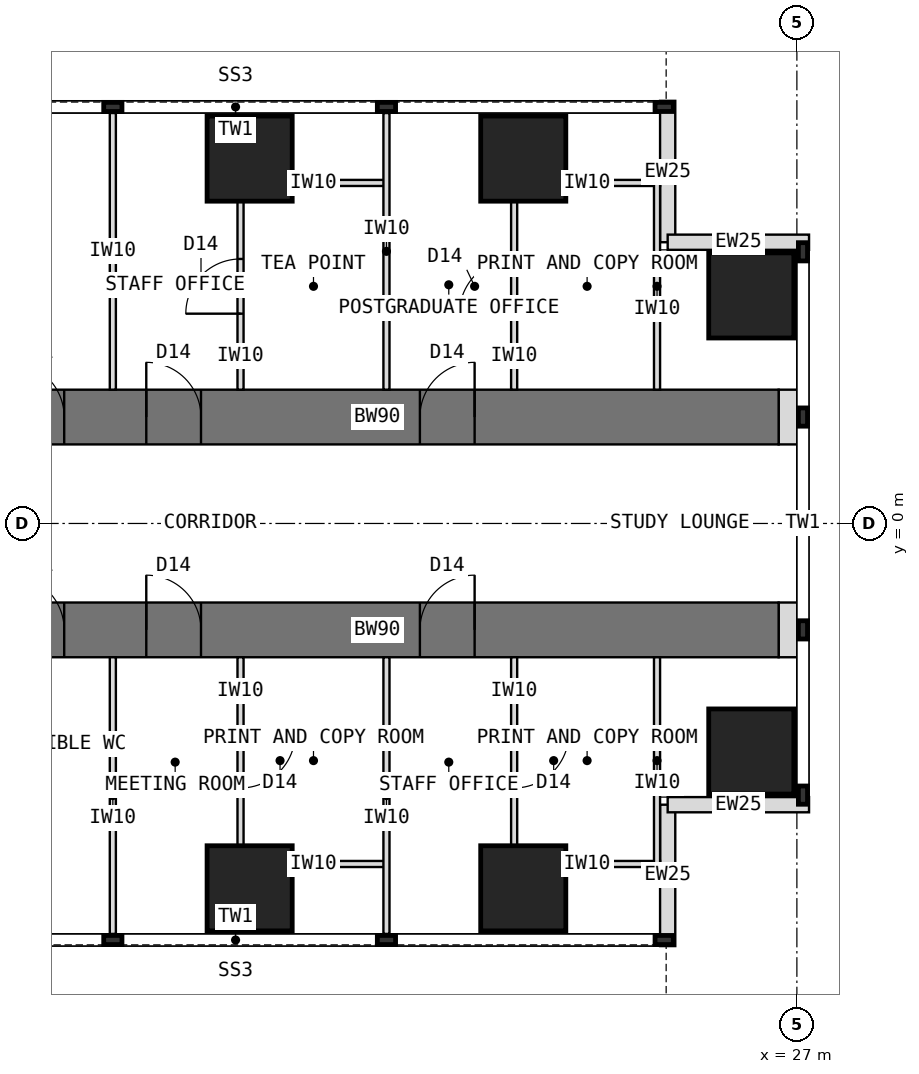
"""IFC4 building model, lengths in metres.
Left out: names, types, materials, properties, quantities, classifications, styles, units other than length and angle.
Written with IfcOpenShell. Run it as: python <this file> out.ifc"""

import sys

from ifc_helpers import new_model, si_unit, direction, frame, frame_2d, origin, origin_2d, place, context, subcontext, project, spatial, rectangle, extrude, element, fill, save


model = new_model("IFC4")
c1 = context("Model", 3, precision=1e-05, world=origin(), true_north=direction((0.0, 1.0)))
c2 = subcontext(c1, "Body", "Model", "MODEL_VIEW")
j1 = project(units=[si_unit("LENGTHUNIT", "METRE"), si_unit("PLANEANGLEUNIT", "RADIAN")], contexts=[c1])
p1 = place(None, origin())
s1 = spatial("IfcSite", under=j1, at=p1, CompositionType="ELEMENT")
p2 = place(p1, origin())
s2 = spatial("IfcBuilding", under=s1, at=p2, CompositionType="ELEMENT")
p3 = place(p2, frame((0.0, 0.0, 88.5)))
s3 = spatial("IfcBuildingStorey", under=s2, at=p3, CompositionType="ELEMENT", Elevation=88.5)
p4 = place(p3, frame((13.5, 1.75, 0.0), z_axis=(0.0, 0.0, 1.0), x_axis=(1.0, 0.0, 0.0)))
e1 = element("IfcWall", 1, at=p4, inside=s3, PredefinedType="SHEAR", context=c2, shape_type="SweptSolid", body=[
    extrude(rectangle(XDim=13.2, YDim=0.9, at=frame_2d((6.6, 0.0))), origin(), (0.0, 0.0, 1.0), 4.0),
])
p5 = place(p4, frame((0.55, 0.0, 0.0)))
e2 = element("IfcOpeningElement", 2, at=p5, cuts=e1, PredefinedType="OPENING", context=c2, shape_type="SweptSolid", body=[
    extrude(rectangle(XDim=0.9, YDim=2.1, at=frame_2d((0.45, 1.05))), frame((0.0, 0.46, 0.0), z_axis=(0.0, -1.0, 0.0), x_axis=(1.0, 0.0, 0.0)), (0.0, 0.0, 1.0), 0.92),
])
p6 = place(p4, frame((2.8, 0.0, 0.0)))
e3 = element("IfcOpeningElement", 3, at=p6, cuts=e1, PredefinedType="OPENING", context=c2, shape_type="SweptSolid", body=[
    extrude(rectangle(XDim=0.9, YDim=2.1, at=frame_2d((0.45, 1.05))), frame((0.0, 0.46, 0.0), z_axis=(0.0, -1.0, 0.0), x_axis=(1.0, 0.0, 0.0)), (0.0, 0.0, 1.0), 0.92),
])
p7 = place(p4, frame((7.3, 0.0, 0.0)))
e4 = element("IfcOpeningElement", 4, at=p7, cuts=e1, PredefinedType="OPENING", context=c2, shape_type="SweptSolid", body=[
    extrude(rectangle(XDim=0.9, YDim=2.1, at=frame_2d((0.45, 1.05))), frame((0.0, 0.46, 0.0), z_axis=(0.0, -1.0, 0.0), x_axis=(1.0, 0.0, 0.0)), (0.0, 0.0, 1.0), 0.92),
])
p8 = place(p3, frame((13.5, -1.75, 0.0), z_axis=(0.0, 0.0, 1.0), x_axis=(1.0, 0.0, 0.0)))
e5 = element("IfcWall", 5, at=p8, inside=s3, PredefinedType="SHEAR", context=c2, shape_type="SweptSolid", body=[
    extrude(rectangle(XDim=13.2, YDim=0.9, at=frame_2d((6.6, 0.0))), origin(), (0.0, 0.0, 1.0), 4.0),
])
p9 = place(p8, frame((0.55, 0.0, 0.0)))
e6 = element("IfcOpeningElement", 6, at=p9, cuts=e5, PredefinedType="OPENING", context=c2, shape_type="SweptSolid", body=[
    extrude(rectangle(XDim=0.9, YDim=2.1, at=frame_2d((0.45, 1.05))), frame((0.0, 0.46, 0.0), z_axis=(0.0, -1.0, 0.0), x_axis=(1.0, 0.0, 0.0)), (0.0, 0.0, 1.0), 0.92),
])
p10 = place(p8, frame((2.8, 0.0, 0.0)))
e7 = element("IfcOpeningElement", 7, at=p10, cuts=e5, PredefinedType="OPENING", context=c2, shape_type="SweptSolid", body=[
    extrude(rectangle(XDim=0.9, YDim=2.1, at=frame_2d((0.45, 1.05))), frame((0.0, 0.46, 0.0), z_axis=(0.0, -1.0, 0.0), x_axis=(1.0, 0.0, 0.0)), (0.0, 0.0, 1.0), 0.92),
])
p11 = place(p8, frame((7.3, 0.0, 0.0)))
e8 = element("IfcOpeningElement", 8, at=p11, cuts=e5, PredefinedType="OPENING", context=c2, shape_type="SweptSolid", body=[
    extrude(rectangle(XDim=0.9, YDim=2.1, at=frame_2d((0.45, 1.05))), frame((0.0, 0.46, 0.0), z_axis=(0.0, -1.0, 0.0), x_axis=(1.0, 0.0, 0.0)), (0.0, 0.0, 1.0), 0.92),
])
for number, where, z_axis, x_axis in (
    (9, (18.0, 6.0, 0.0), (0.0, 0.0, 1.0), (1.0, 0.0, 0.0)),
    (10, (18.0, -6.0, 0.0), (0.0, 0.0, 1.0), (1.0, 0.0, 0.0)),
    (11, (22.5, 6.0, 0.0), (0.0, 0.0, 1.0), (1.0, 0.0, 0.0)),
    (12, (22.5, -6.0, 0.0), (0.0, 0.0, 1.0), (1.0, 0.0, 0.0)),
    (13, (26.25, 3.75, 0.0), (0.0, 0.0, 1.0), (1.0, 0.0, 0.0)),
    (14, (26.25, -3.75, 0.0), (0.0, 0.0, 1.0), (1.0, 0.0, 0.0)),
):
    element("IfcColumn", number, at=place(p3, frame(where, z_axis=z_axis, x_axis=x_axis)), inside=s3, PredefinedType="COLUMN", context=c2, shape_type="SweptSolid", body=[
        extrude(rectangle(XDim=1.4, YDim=1.4, at=origin_2d()), origin(), (0.0, 0.0, 1.0), 4.0),
    ])
for number, where, z_axis, x_axis in (
    (15, (24.875, 6.95, 0.0), (0.0, 0.0, 1.0), (0.0, -1.0, 0.0)),
    (16, (24.875, 4.625, 0.0), (0.0, 0.0, 1.0), (1.0, 0.0, 0.0)),
    (17, (24.875, -6.95, 0.0), (0.0, 0.0, 1.0), (0.0, 1.0, 0.0)),
    (18, (24.875, -4.625, 0.0), (0.0, 0.0, 1.0), (1.0, 0.0, 0.0)),
):
    element("IfcWall", number, at=place(p3, frame(where, z_axis=z_axis, x_axis=x_axis)), inside=s3, PredefinedType="STANDARD", context=c2, shape_type="SweptSolid", body=[
        extrude(rectangle(XDim=2.325, YDim=0.25, at=frame_2d((1.163, 0.0))), origin(), (0.0, 0.0, 1.0), 3.7),
    ])
for number, where, z_axis, x_axis in (
    (19, (26.7, 1.75, 0.0), (0.0, 0.0, 1.0), (1.0, 0.0, 0.0)),
    (20, (26.7, -1.75, 0.0), (0.0, 0.0, 1.0), (1.0, 0.0, 0.0)),
):
    element("IfcWall", number, at=place(p3, frame(where, z_axis=z_axis, x_axis=x_axis)), inside=s3, PredefinedType="PARTITIONING", context=c2, shape_type="SweptSolid", body=[
        extrude(rectangle(XDim=0.31, YDim=0.9, at=frame_2d((0.155, 0.0))), origin(), (0.0, 0.0, 1.0), 3.7),
    ])
for number, where, z_axis, x_axis in (
    (21, (15.75, 2.2, 0.0), (0.0, 0.0, 1.0), (0.0, 1.0, 0.0)),
    (22, (20.25, 2.2, 0.0), (0.0, 0.0, 1.0), (0.0, 1.0, 0.0)),
):
    element("IfcWall", number, at=place(p3, frame(where, z_axis=z_axis, x_axis=x_axis)), inside=s3, PredefinedType="PARTITIONING", context=c2, shape_type="SweptSolid", body=[
        extrude(rectangle(XDim=4.55, YDim=0.1, at=frame_2d((2.275, 0.0))), origin(), (0.0, 0.0, 1.0), 3.7),
    ])
p12 = place(p3, frame((17.85, 5.6, 0.0), z_axis=(0.0, 0.0, 1.0), x_axis=(1.0, 0.0, 0.0)))
e23 = element("IfcWall", 23, at=p12, inside=s3, PredefinedType="PARTITIONING", context=c2, shape_type="SweptSolid", body=[
    extrude(rectangle(XDim=2.4, YDim=0.1, at=frame_2d((1.2, 0.0))), origin(), (0.0, 0.0, 1.0), 3.7),
])
p13 = place(p3, frame((17.85, 2.2, 0.0), z_axis=(0.0, 0.0, 1.0), x_axis=(0.0, 1.0, 0.0)))
e24 = element("IfcWall", 24, at=p13, inside=s3, PredefinedType="PARTITIONING", context=c2, shape_type="SweptSolid", body=[
    extrude(rectangle(XDim=3.4, YDim=0.1, at=frame_2d((1.7, 0.0))), origin(), (0.0, 0.0, 1.0), 3.7),
])
p14 = place(p13, frame((1.25, 0.0, 0.0)))
e25 = element("IfcOpeningElement", 25, at=p14, cuts=e24, PredefinedType="OPENING", context=c2, shape_type="SweptSolid", body=[
    extrude(rectangle(XDim=0.9, YDim=2.1, at=frame_2d((0.45, 1.05))), frame((0.0, 0.06, 0.0), z_axis=(0.0, -1.0, 0.0), x_axis=(1.0, 0.0, 0.0)), (0.0, 0.0, 1.0), 0.12),
])
p15 = place(p3, frame((22.35, 5.6, 0.0), z_axis=(0.0, 0.0, 1.0), x_axis=(1.0, 0.0, 0.0)))
e26 = element("IfcWall", 26, at=p15, inside=s3, PredefinedType="PARTITIONING", context=c2, shape_type="SweptSolid", body=[
    extrude(rectangle(XDim=2.4, YDim=0.1, at=frame_2d((1.2, 0.0))), origin(), (0.0, 0.0, 1.0), 3.7),
])
p16 = place(p3, frame((22.35, 2.2, 0.0), z_axis=(0.0, 0.0, 1.0), x_axis=(0.0, 1.0, 0.0)))
e27 = element("IfcWall", 27, at=p16, inside=s3, PredefinedType="PARTITIONING", context=c2, shape_type="SweptSolid", body=[
    extrude(rectangle(XDim=3.4, YDim=0.1, at=frame_2d((1.7, 0.0))), origin(), (0.0, 0.0, 1.0), 3.7),
])
p17 = place(p16, frame((1.25, 0.0, 0.0)))
e28 = element("IfcOpeningElement", 28, at=p17, cuts=e27, PredefinedType="OPENING", context=c2, shape_type="SweptSolid", body=[
    extrude(rectangle(XDim=0.9, YDim=2.1, at=frame_2d((0.45, 1.05))), frame((0.0, 0.06, 0.0), z_axis=(0.0, -1.0, 0.0), x_axis=(1.0, 0.0, 0.0)), (0.0, 0.0, 1.0), 0.12),
])
p18 = place(p3, frame((24.7, 2.2, 0.0), z_axis=(0.0, 0.0, 1.0), x_axis=(0.0, 1.0, 0.0)))
e29 = element("IfcWall", 29, at=p18, inside=s3, PredefinedType="PARTITIONING", context=c2, shape_type="SweptSolid", body=[
    extrude(rectangle(XDim=3.4, YDim=0.1, at=frame_2d((1.7, 0.0))), origin(), (0.0, 0.0, 1.0), 3.7),
])
for number, where, z_axis, x_axis in (
    (30, (15.75, -2.2, 0.0), (0.0, 0.0, 1.0), (0.0, -1.0, 0.0)),
    (31, (20.25, -2.2, 0.0), (0.0, 0.0, 1.0), (0.0, -1.0, 0.0)),
):
    element("IfcWall", number, at=place(p3, frame(where, z_axis=z_axis, x_axis=x_axis)), inside=s3, PredefinedType="PARTITIONING", context=c2, shape_type="SweptSolid", body=[
        extrude(rectangle(XDim=4.55, YDim=0.1, at=frame_2d((2.275, 0.0))), origin(), (0.0, 0.0, 1.0), 3.7),
    ])
p19 = place(p3, frame((17.85, -5.6, 0.0), z_axis=(0.0, 0.0, 1.0), x_axis=(1.0, 0.0, 0.0)))
e32 = element("IfcWall", 32, at=p19, inside=s3, PredefinedType="PARTITIONING", context=c2, shape_type="SweptSolid", body=[
    extrude(rectangle(XDim=2.4, YDim=0.1, at=frame_2d((1.2, 0.0))), origin(), (0.0, 0.0, 1.0), 3.7),
])
p20 = place(p3, frame((17.85, -2.2, 0.0), z_axis=(0.0, 0.0, 1.0), x_axis=(0.0, -1.0, 0.0)))
e33 = element("IfcWall", 33, at=p20, inside=s3, PredefinedType="PARTITIONING", context=c2, shape_type="SweptSolid", body=[
    extrude(rectangle(XDim=3.4, YDim=0.1, at=frame_2d((1.7, 0.0))), origin(), (0.0, 0.0, 1.0), 3.7),
])
p21 = place(p20, frame((1.25, 0.0, 0.0)))
e34 = element("IfcOpeningElement", 34, at=p21, cuts=e33, PredefinedType="OPENING", context=c2, shape_type="SweptSolid", body=[
    extrude(rectangle(XDim=0.9, YDim=2.1, at=frame_2d((0.45, 1.05))), frame((0.0, 0.06, 0.0), z_axis=(0.0, -1.0, 0.0), x_axis=(1.0, 0.0, 0.0)), (0.0, 0.0, 1.0), 0.12),
])
p22 = place(p3, frame((22.35, -5.6, 0.0), z_axis=(0.0, 0.0, 1.0), x_axis=(1.0, 0.0, 0.0)))
e35 = element("IfcWall", 35, at=p22, inside=s3, PredefinedType="PARTITIONING", context=c2, shape_type="SweptSolid", body=[
    extrude(rectangle(XDim=2.4, YDim=0.1, at=frame_2d((1.2, 0.0))), origin(), (0.0, 0.0, 1.0), 3.7),
])
p23 = place(p3, frame((22.35, -2.2, 0.0), z_axis=(0.0, 0.0, 1.0), x_axis=(0.0, -1.0, 0.0)))
e36 = element("IfcWall", 36, at=p23, inside=s3, PredefinedType="PARTITIONING", context=c2, shape_type="SweptSolid", body=[
    extrude(rectangle(XDim=3.4, YDim=0.1, at=frame_2d((1.7, 0.0))), origin(), (0.0, 0.0, 1.0), 3.7),
])
p24 = place(p23, frame((1.25, 0.0, 0.0)))
e37 = element("IfcOpeningElement", 37, at=p24, cuts=e36, PredefinedType="OPENING", context=c2, shape_type="SweptSolid", body=[
    extrude(rectangle(XDim=0.9, YDim=2.1, at=frame_2d((0.45, 1.05))), frame((0.0, 0.06, 0.0), z_axis=(0.0, -1.0, 0.0), x_axis=(1.0, 0.0, 0.0)), (0.0, 0.0, 1.0), 0.12),
])
p25 = place(p3, frame((24.7, -2.2, 0.0), z_axis=(0.0, 0.0, 1.0), x_axis=(0.0, -1.0, 0.0)))
e38 = element("IfcWall", 38, at=p25, inside=s3, PredefinedType="PARTITIONING", context=c2, shape_type="SweptSolid", body=[
    extrude(rectangle(XDim=3.4, YDim=0.1, at=frame_2d((1.7, 0.0))), origin(), (0.0, 0.0, 1.0), 3.7),
])
p26 = place(p14, origin())
e39 = element("IfcDoor", 39, at=p26, inside=s3, OperationType="SINGLE_SWING_LEFT", PredefinedType="DOOR", context=c2, shape_type="SweptSolid", body=[
    extrude(rectangle(XDim=0.9, YDim=2.1, at=frame_2d((0.45, 1.05))), frame((0.0, 0.025, 0.0), z_axis=(0.0, -1.0, 0.0), x_axis=(1.0, 0.0, 0.0)), (0.0, 0.0, 1.0), 0.05),
])
fill(e25, e39)
p27 = place(p17, origin())
e40 = element("IfcDoor", 40, at=p27, inside=s3, OperationType="SINGLE_SWING_LEFT", PredefinedType="DOOR", context=c2, shape_type="SweptSolid", body=[
    extrude(rectangle(XDim=0.9, YDim=2.1, at=frame_2d((0.45, 1.05))), frame((0.0, 0.025, 0.0), z_axis=(0.0, -1.0, 0.0), x_axis=(1.0, 0.0, 0.0)), (0.0, 0.0, 1.0), 0.05),
])
fill(e28, e40)
p28 = place(p21, origin())
e41 = element("IfcDoor", 41, at=p28, inside=s3, OperationType="SINGLE_SWING_LEFT", PredefinedType="DOOR", context=c2, shape_type="SweptSolid", body=[
    extrude(rectangle(XDim=0.9, YDim=2.1, at=frame_2d((0.45, 1.05))), frame((0.0, 0.025, 0.0), z_axis=(0.0, -1.0, 0.0), x_axis=(1.0, 0.0, 0.0)), (0.0, 0.0, 1.0), 0.05),
])
fill(e34, e41)
p29 = place(p24, origin())
e42 = element("IfcDoor", 42, at=p29, inside=s3, OperationType="SINGLE_SWING_LEFT", PredefinedType="DOOR", context=c2, shape_type="SweptSolid", body=[
    extrude(rectangle(XDim=0.9, YDim=2.1, at=frame_2d((0.45, 1.05))), frame((0.0, 0.025, 0.0), z_axis=(0.0, -1.0, 0.0), x_axis=(1.0, 0.0, 0.0)), (0.0, 0.0, 1.0), 0.05),
])
fill(e37, e42)
p30 = place(p5, origin())
e43 = element("IfcDoor", 43, at=p30, inside=s3, OperationType="SINGLE_SWING_LEFT", PredefinedType="DOOR", context=c2, shape_type="SweptSolid", body=[
    extrude(rectangle(XDim=0.82, YDim=2.06, at=frame_2d((0.45, 1.03))), frame((0.0, 0.025, 0.0), z_axis=(0.0, -1.0, 0.0), x_axis=(1.0, 0.0, 0.0)), (0.0, 0.0, 1.0), 0.05),
    extrude(rectangle(XDim=0.04, YDim=2.1, at=frame_2d((0.02, 1.05))), frame((0.0, 0.45, 0.0), z_axis=(0.0, -1.0, 0.0), x_axis=(1.0, 0.0, 0.0)), (0.0, 0.0, 1.0), 0.899),
    extrude(rectangle(XDim=0.04, YDim=2.1, at=frame_2d((0.88, 1.05))), frame((0.0, 0.45, 0.0), z_axis=(0.0, -1.0, 0.0), x_axis=(1.0, 0.0, 0.0)), (0.0, 0.0, 1.0), 0.899),
    extrude(rectangle(XDim=0.82, YDim=0.04, at=frame_2d((0.45, 2.08))), frame((0.0, 0.45, 0.0), z_axis=(0.0, -1.0, 0.0), x_axis=(1.0, 0.0, 0.0)), (0.0, 0.0, 1.0), 0.899),
])
fill(e2, e43)
p31 = place(p6, origin())
e44 = element("IfcDoor", 44, at=p31, inside=s3, OperationType="SINGLE_SWING_LEFT", PredefinedType="DOOR", context=c2, shape_type="SweptSolid", body=[
    extrude(rectangle(XDim=0.82, YDim=2.06, at=frame_2d((0.45, 1.03))), frame((0.0, 0.025, 0.0), z_axis=(0.0, -1.0, 0.0), x_axis=(1.0, 0.0, 0.0)), (0.0, 0.0, 1.0), 0.05),
    extrude(rectangle(XDim=0.04, YDim=2.1, at=frame_2d((0.02, 1.05))), frame((0.0, 0.45, 0.0), z_axis=(0.0, -1.0, 0.0), x_axis=(1.0, 0.0, 0.0)), (0.0, 0.0, 1.0), 0.899),
    extrude(rectangle(XDim=0.04, YDim=2.1, at=frame_2d((0.88, 1.05))), frame((0.0, 0.45, 0.0), z_axis=(0.0, -1.0, 0.0), x_axis=(1.0, 0.0, 0.0)), (0.0, 0.0, 1.0), 0.899),
    extrude(rectangle(XDim=0.82, YDim=0.04, at=frame_2d((0.45, 2.08))), frame((0.0, 0.45, 0.0), z_axis=(0.0, -1.0, 0.0), x_axis=(1.0, 0.0, 0.0)), (0.0, 0.0, 1.0), 0.899),
])
fill(e3, e44)
p32 = place(p7, origin())
e45 = element("IfcDoor", 45, at=p32, inside=s3, OperationType="SINGLE_SWING_RIGHT", PredefinedType="DOOR", context=c2, shape_type="SweptSolid", body=[
    extrude(rectangle(XDim=0.82, YDim=2.06, at=frame_2d((0.45, 1.03))), frame((0.0, 0.025, 0.0), z_axis=(0.0, -1.0, 0.0), x_axis=(1.0, 0.0, 0.0)), (0.0, 0.0, 1.0), 0.05),
    extrude(rectangle(XDim=0.04, YDim=2.1, at=frame_2d((0.02, 1.05))), frame((0.0, 0.45, 0.0), z_axis=(0.0, -1.0, 0.0), x_axis=(1.0, 0.0, 0.0)), (0.0, 0.0, 1.0), 0.899),
    extrude(rectangle(XDim=0.04, YDim=2.1, at=frame_2d((0.88, 1.05))), frame((0.0, 0.45, 0.0), z_axis=(0.0, -1.0, 0.0), x_axis=(1.0, 0.0, 0.0)), (0.0, 0.0, 1.0), 0.899),
    extrude(rectangle(XDim=0.82, YDim=0.04, at=frame_2d((0.45, 2.08))), frame((0.0, 0.45, 0.0), z_axis=(0.0, -1.0, 0.0), x_axis=(1.0, 0.0, 0.0)), (0.0, 0.0, 1.0), 0.899),
])
fill(e4, e45)
p33 = place(p9, origin())
e46 = element("IfcDoor", 46, at=p33, inside=s3, OperationType="SINGLE_SWING_LEFT", PredefinedType="DOOR", context=c2, shape_type="SweptSolid", body=[
    extrude(rectangle(XDim=0.82, YDim=2.06, at=frame_2d((0.45, 1.03))), frame((0.0, 0.025, 0.0), z_axis=(0.0, -1.0, 0.0), x_axis=(1.0, 0.0, 0.0)), (0.0, 0.0, 1.0), 0.05),
    extrude(rectangle(XDim=0.04, YDim=2.1, at=frame_2d((0.02, 1.05))), frame((0.0, 0.45, 0.0), z_axis=(0.0, -1.0, 0.0), x_axis=(1.0, 0.0, 0.0)), (0.0, 0.0, 1.0), 0.899),
    extrude(rectangle(XDim=0.04, YDim=2.1, at=frame_2d((0.88, 1.05))), frame((0.0, 0.45, 0.0), z_axis=(0.0, -1.0, 0.0), x_axis=(1.0, 0.0, 0.0)), (0.0, 0.0, 1.0), 0.899),
    extrude(rectangle(XDim=0.82, YDim=0.04, at=frame_2d((0.45, 2.08))), frame((0.0, 0.45, 0.0), z_axis=(0.0, -1.0, 0.0), x_axis=(1.0, 0.0, 0.0)), (0.0, 0.0, 1.0), 0.899),
])
fill(e6, e46)
p34 = place(p10, origin())
e47 = element("IfcDoor", 47, at=p34, inside=s3, OperationType="SINGLE_SWING_LEFT", PredefinedType="DOOR", context=c2, shape_type="SweptSolid", body=[
    extrude(rectangle(XDim=0.82, YDim=2.06, at=frame_2d((0.45, 1.03))), frame((0.0, 0.025, 0.0), z_axis=(0.0, -1.0, 0.0), x_axis=(1.0, 0.0, 0.0)), (0.0, 0.0, 1.0), 0.05),
    extrude(rectangle(XDim=0.04, YDim=2.1, at=frame_2d((0.02, 1.05))), frame((0.0, 0.45, 0.0), z_axis=(0.0, -1.0, 0.0), x_axis=(1.0, 0.0, 0.0)), (0.0, 0.0, 1.0), 0.899),
    extrude(rectangle(XDim=0.04, YDim=2.1, at=frame_2d((0.88, 1.05))), frame((0.0, 0.45, 0.0), z_axis=(0.0, -1.0, 0.0), x_axis=(1.0, 0.0, 0.0)), (0.0, 0.0, 1.0), 0.899),
    extrude(rectangle(XDim=0.82, YDim=0.04, at=frame_2d((0.45, 2.08))), frame((0.0, 0.45, 0.0), z_axis=(0.0, -1.0, 0.0), x_axis=(1.0, 0.0, 0.0)), (0.0, 0.0, 1.0), 0.899),
])
fill(e7, e47)
p35 = place(p11, origin())
e48 = element("IfcDoor", 48, at=p35, inside=s3, OperationType="SINGLE_SWING_RIGHT", PredefinedType="DOOR", context=c2, shape_type="SweptSolid", body=[
    extrude(rectangle(XDim=0.82, YDim=2.06, at=frame_2d((0.45, 1.03))), frame((0.0, 0.025, 0.0), z_axis=(0.0, -1.0, 0.0), x_axis=(1.0, 0.0, 0.0)), (0.0, 0.0, 1.0), 0.05),
    extrude(rectangle(XDim=0.04, YDim=2.1, at=frame_2d((0.02, 1.05))), frame((0.0, 0.45, 0.0), z_axis=(0.0, -1.0, 0.0), x_axis=(1.0, 0.0, 0.0)), (0.0, 0.0, 1.0), 0.899),
    extrude(rectangle(XDim=0.04, YDim=2.1, at=frame_2d((0.88, 1.05))), frame((0.0, 0.45, 0.0), z_axis=(0.0, -1.0, 0.0), x_axis=(1.0, 0.0, 0.0)), (0.0, 0.0, 1.0), 0.899),
    extrude(rectangle(XDim=0.82, YDim=0.04, at=frame_2d((0.45, 2.08))), frame((0.0, 0.45, 0.0), z_axis=(0.0, -1.0, 0.0), x_axis=(1.0, 0.0, 0.0)), (0.0, 0.0, 1.0), 0.899),
])
fill(e8, e48)
save(model, sys.argv[1])
